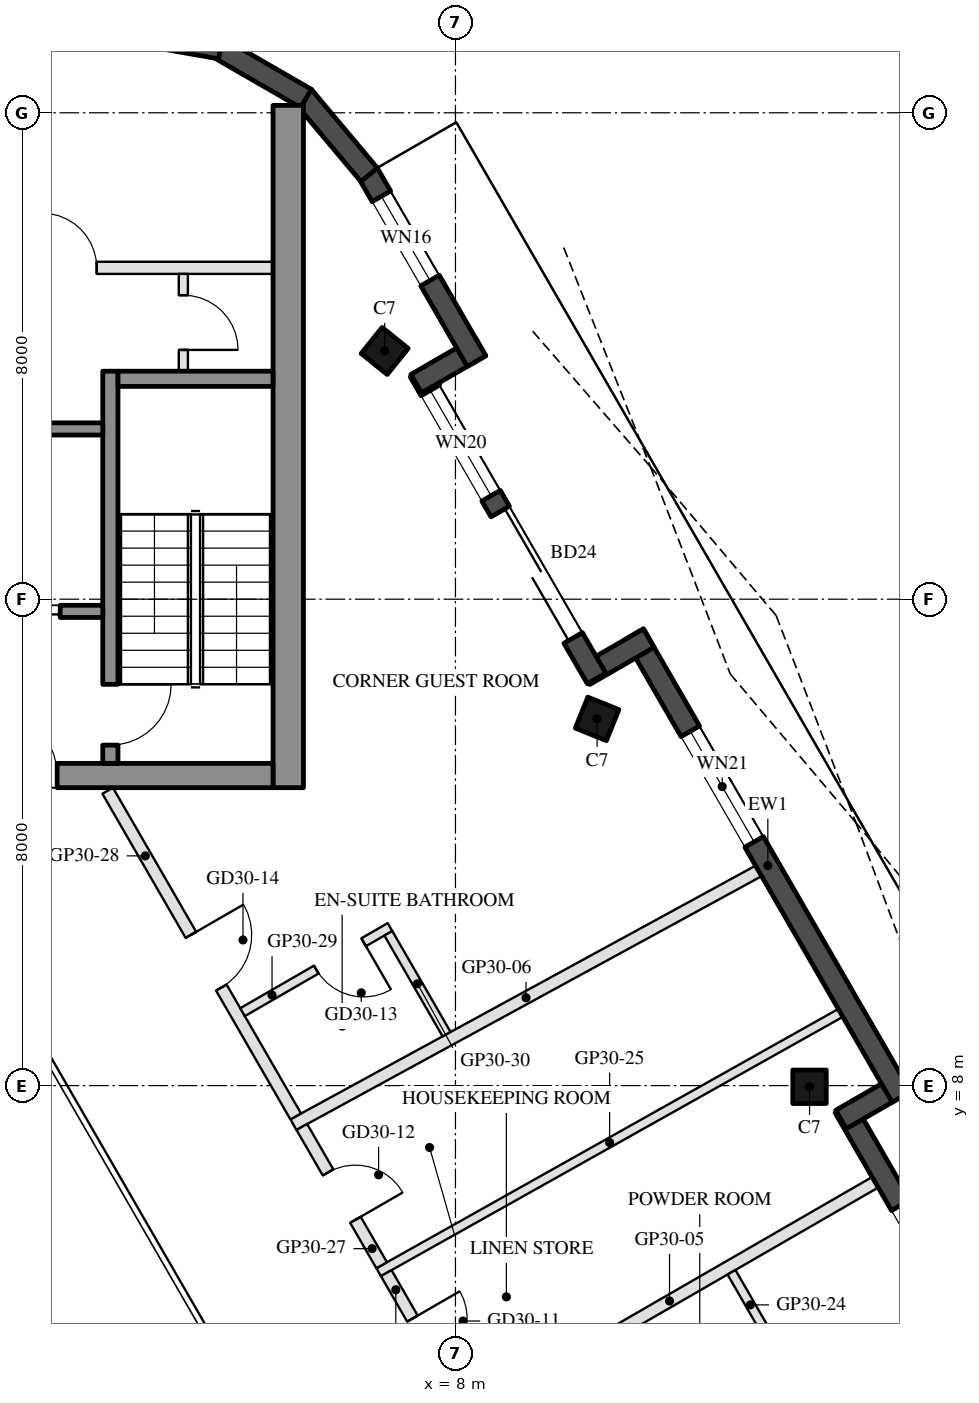
"""IFC4 building model, lengths in metres.
Left out: names, types, materials, properties, quantities, classifications, styles, units other than length and angle.
Written with IfcOpenShell. Run it as: python <this file> out.ifc"""

import sys

from ifc_helpers import new_model, si_unit, direction, frame, frame_2d, origin, origin_2d, place, context, subcontext, project, spatial, rectangle, hollow_rectangle, extrude, boolean, halfspace, element, fill, save


model = new_model("IFC4")
c1 = context("Model", 3, precision=1e-05, world=origin(), true_north=direction((0.0, 1.0)))
c2 = subcontext(c1, "Body", "Model", "MODEL_VIEW")
j1 = project(units=[si_unit("LENGTHUNIT", "METRE"), si_unit("PLANEANGLEUNIT", "RADIAN")], contexts=[c1])
p1 = place(None, origin())
s1 = spatial("IfcSite", under=j1, at=p1, CompositionType="ELEMENT")
p2 = place(p1, origin())
s2 = spatial("IfcBuilding", under=s1, at=p2, CompositionType="ELEMENT")
p3 = place(p2, frame((0.0, 0.0, 298.5)))
s3 = spatial("IfcBuildingStorey", under=s2, at=p3, CompositionType="ELEMENT", Elevation=298.5)
p4 = place(p3, frame((13.823, 7.981, 0.0), z_axis=(-0.131228839908, -0.075723997581, 0.988455799602), x_axis=(0.499841813697, -0.866116713392, 7.933019e-06)))
e1 = element("IfcColumn", 1, at=p4, inside=s3, PredefinedType="COLUMN", context=c2, shape_type="SweptSolid", body=[
    boolean("DIFFERENCE", boolean("DIFFERENCE", extrude(hollow_rectangle(XDim=0.55, YDim=0.55, WallThickness=0.025, at=origin_2d()), origin(), (0.0, 0.0, 1.0), 3.743), halfspace(frame((0.0, 0.0, 0.031), z_axis=(0.0, 0.0, 1.0), x_axis=(1.0, 0.0, 0.0)), True)), halfspace(frame((0.0, 0.0, 3.712), z_axis=(0.0, 0.0, 1.0), x_axis=(1.0, 0.0, 0.0)), False)),
])
p5 = place(p3, frame((10.33, 14.032, 0.0), z_axis=(-0.100518021011, -0.128316722417, 0.98662604172), x_axis=(-0.503129383785, 0.862065632243, 0.060857775822)))
e2 = element("IfcColumn", 2, at=p5, inside=s3, PredefinedType="COLUMN", context=c2, shape_type="SweptSolid", body=[
    boolean("DIFFERENCE", boolean("DIFFERENCE", extrude(hollow_rectangle(XDim=0.55, YDim=0.55, WallThickness=0.025, at=origin_2d()), origin(), (0.0, 0.0, 1.0), 3.75), halfspace(frame((0.0, 0.0, 0.034), z_axis=(0.0, 0.0, 1.0), x_axis=(1.0, 0.0, 0.0)), True)), halfspace(frame((0.0, 0.0, 3.716), z_axis=(0.0, 0.0, 1.0), x_axis=(1.0, 0.0, 0.0)), False)),
])
p6 = place(p3, frame((6.836, 20.083, 0.0), z_axis=(-0.069728397733, -0.180050765176, 0.981182792608), x_axis=(-0.504246941598, 0.855030910201, 0.121066776982)))
e3 = element("IfcColumn", 3, at=p6, inside=s3, PredefinedType="COLUMN", context=c2, shape_type="SweptSolid", body=[
    boolean("DIFFERENCE", boolean("DIFFERENCE", extrude(hollow_rectangle(XDim=0.55, YDim=0.55, WallThickness=0.025, at=origin_2d()), origin(), (0.0, 0.0, 1.0), 3.771), halfspace(frame((0.0, 0.0, 0.04), z_axis=(0.0, 0.0, 1.0), x_axis=(1.0, 0.0, 0.0)), True)), halfspace(frame((0.0, 0.0, 3.731), z_axis=(0.0, 0.0, 1.0), x_axis=(1.0, 0.0, 0.0)), False)),
])
p7 = place(p3, frame((17.308, 2.595, 0.0), z_axis=(0.0, 0.0, 1.0), x_axis=(-0.500005339912, 0.866022320763, 0.0)))
e4 = element("IfcWall", 4, at=p7, inside=s3, PredefinedType="SOLIDWALL", context=c2, shape_type="SweptSolid", body=[
    extrude(rectangle(XDim=5.827, YDim=0.35, at=frame_2d((2.914, 0.0))), origin(), (0.0, 0.0, 1.0), 3.55),
])
p8 = place(p7, frame((0.77, 0.0, 0.3)))
e5 = element("IfcOpeningElement", 5, at=p8, cuts=e4, PredefinedType="OPENING", context=c2, shape_type="SweptSolid", body=[
    extrude(rectangle(XDim=3.2, YDim=2.65, at=frame_2d((1.6, 1.325))), frame((0.0, 0.185, 0.0), z_axis=(0.0, -1.0, 0.0), x_axis=(1.0, 0.0, 0.0)), (0.0, 0.0, 1.0), 0.37),
])
p9 = place(p3, frame((14.342, 7.443, 0.0), z_axis=(0.0, 0.0, 1.0), x_axis=(0.866092288191, 0.499884134912, 0.0)))
e6 = element("IfcWall", 6, at=p9, inside=s3, PredefinedType="SOLIDWALL", context=c2, shape_type="SweptSolid", body=[
    extrude(rectangle(XDim=1.22, YDim=0.35, at=frame_2d((0.61, 0.0))), origin(), (0.0, 0.0, 1.0), 3.55),
])
p10 = place(p3, frame((15.334, 7.814, 0.0), z_axis=(0.0, 0.0, 1.0), x_axis=(-0.499999835575, 0.866025498715, 0.0)))
e7 = element("IfcWall", 7, at=p10, inside=s3, PredefinedType="SOLIDWALL", context=c2, shape_type="SweptSolid", body=[
    extrude(rectangle(XDim=8.787, YDim=0.35, at=frame_2d((4.394, 0.0))), origin(), (0.0, 0.0, 1.0), 3.55),
])
p11 = place(p10, frame((4.844, 0.0, 0.3)))
e8 = element("IfcOpeningElement", 8, at=p11, cuts=e7, PredefinedType="OPENING", context=c2, shape_type="SweptSolid", body=[
    extrude(rectangle(XDim=2.1, YDim=2.65, at=frame_2d((1.05, 1.325))), frame((0.0, 0.185, 0.0), z_axis=(0.0, -1.0, 0.0), x_axis=(1.0, 0.0, 0.0)), (0.0, 0.0, 1.0), 0.37),
])
p12 = place(p3, frame((11.18, 15.36, 0.0), z_axis=(0.0, 0.0, 1.0), x_axis=(-0.866055662726, -0.499947586314, 0.0)))
e9 = element("IfcWall", 9, at=p12, inside=s3, PredefinedType="SOLIDWALL", context=c2, shape_type="SweptSolid", body=[
    extrude(rectangle(XDim=1.22, YDim=0.35, at=frame_2d((0.61, 0.0))), origin(), (0.0, 0.0, 1.0), 3.55),
])
p13 = place(p3, frame((10.321, 14.697, 0.0), z_axis=(0.0, 0.0, 1.0), x_axis=(-0.500005339912, 0.866022320763, 0.0)))
e10 = element("IfcWall", 10, at=p13, inside=s3, PredefinedType="SOLIDWALL", context=c2, shape_type="SweptSolid", body=[
    extrude(rectangle(XDim=5.827, YDim=0.35, at=frame_2d((2.914, 0.0))), origin(), (0.0, 0.0, 1.0), 3.55),
])
p14 = place(p13, frame((0.77, 0.0, 0.0)))
e11 = element("IfcOpeningElement", 11, at=p14, cuts=e10, PredefinedType="OPENING", context=c2, shape_type="SweptSolid", body=[
    extrude(rectangle(XDim=2.4, YDim=2.4, at=frame_2d((1.2, 1.2))), frame((0.0, 0.185, 0.0), z_axis=(0.0, -1.0, 0.0), x_axis=(1.0, 0.0, 0.0)), (0.0, 0.0, 1.0), 0.37),
])
p15 = place(p13, frame((3.47, 0.0, 0.3)))
e12 = element("IfcOpeningElement", 12, at=p15, cuts=e10, PredefinedType="OPENING", context=c2, shape_type="SweptSolid", body=[
    extrude(rectangle(XDim=2.0, YDim=2.65, at=frame_2d((1.0, 1.325))), frame((0.0, 0.185, 0.0), z_axis=(0.0, -1.0, 0.0), x_axis=(1.0, 0.0, 0.0)), (0.0, 0.0, 1.0), 0.37),
])
p16 = place(p3, frame((7.354, 19.545, 0.0), z_axis=(0.0, 0.0, 1.0), x_axis=(0.865955602162, 0.500120880472, 0.0)))
e13 = element("IfcWall", 13, at=p16, inside=s3, PredefinedType="SOLIDWALL", context=c2, shape_type="SweptSolid", body=[
    extrude(rectangle(XDim=1.22, YDim=0.35, at=frame_2d((0.61, 0.0))), origin(), (0.0, 0.0, 1.0), 3.55),
])
p17 = place(p3, frame((8.347, 19.916, 0.0), z_axis=(0.0, 0.0, 1.0), x_axis=(-0.500010763282, 0.866019189511, 0.0)))
e14 = element("IfcWall", 14, at=p17, inside=s3, PredefinedType="SOLIDWALL", context=c2, shape_type="SweptSolid", body=[
    extrude(rectangle(XDim=3.567, YDim=0.35, at=frame_2d((1.784, 0.0))), origin(), (0.0, 0.0, 1.0), 3.55),
])
p18 = place(p17, frame((1.53, 0.0, 0.3)))
e15 = element("IfcOpeningElement", 15, at=p18, cuts=e14, PredefinedType="OPENING", context=c2, shape_type="SweptSolid", body=[
    extrude(rectangle(XDim=1.6, YDim=2.65, at=frame_2d((0.8, 1.325))), frame((0.0, 0.185, 0.0), z_axis=(0.0, -1.0, 0.0), x_axis=(1.0, 0.0, 0.0)), (0.0, 0.0, 1.0), 0.37),
])
for number, where, z_axis, x_axis in (
    (16, (6.581, 22.98, 0.0), (0.0, 0.0, 1.0), (-0.643, 0.766, 0.0)),
    (17, (5.542, 24.236, 0.0), (0.0, 0.0, 1.0), (-0.866, 0.5, 0.0)),
    (18, (4.135, 25.059, 0.0), (0.0, 0.0, 1.0), (-0.985, 0.174, 0.0)),
):
    element("IfcWall", number, at=place(p3, frame(where, z_axis=z_axis, x_axis=x_axis)), inside=s3, PredefinedType="SOLIDWALL", context=c2, shape_type="SweptSolid", body=[
        extrude(rectangle(XDim=1.689, YDim=0.35, at=frame_2d((0.845, 0.0))), origin(), (0.0, 0.0, 1.0), 3.55),
    ])
p19 = place(p3, frame((5.25, 12.9, 0.0), z_axis=(0.0, 0.0, 1.0), x_axis=(0.0, 1.0, 0.0)))
e19 = element("IfcWall", 19, at=p19, inside=s3, PredefinedType="SHEAR", context=c2, shape_type="SweptSolid", body=[
    extrude(rectangle(XDim=11.222, YDim=0.5, at=frame_2d((5.611, 0.0))), origin(), (0.0, 0.0, 1.0), 3.5),
])
p20 = place(p3, frame((5.0, 13.1, 0.0), z_axis=(0.0, 0.0, 1.0), x_axis=(-1.0, 0.0, 0.0)))
e20 = element("IfcWall", 20, at=p20, inside=s3, PredefinedType="SHEAR", context=c2, shape_type="SweptSolid", body=[
    extrude(rectangle(XDim=10.0, YDim=0.4, at=frame_2d((5.0, 0.0))), origin(), (0.0, 0.0, 1.0), 3.5),
])
p21 = place(p20, frame((3.55, 0.0, 0.0)))
e21 = element("IfcOpeningElement", 21, at=p21, cuts=e20, PredefinedType="OPENING", context=c2, shape_type="SweptSolid", body=[
    extrude(rectangle(XDim=1.1, YDim=2.1, at=frame_2d((0.55, 1.05))), frame((0.0, 0.21, 0.0), z_axis=(0.0, -1.0, 0.0), x_axis=(1.0, 0.0, 0.0)), (0.0, 0.0, 1.0), 0.42),
])
p22 = place(p20, frame((5.85, 0.0, 0.0)))
e22 = element("IfcOpeningElement", 22, at=p22, cuts=e20, PredefinedType="OPENING", context=c2, shape_type="SweptSolid", body=[
    extrude(rectangle(XDim=1.4, YDim=2.1, at=frame_2d((0.7, 1.05))), frame((0.0, 0.21, 0.0), z_axis=(0.0, -1.0, 0.0), x_axis=(1.0, 0.0, 0.0)), (0.0, 0.0, 1.0), 0.42),
])
p23 = place(p3, frame((2.325, 13.3, 0.0), z_axis=(0.0, 0.0, 1.0), x_axis=(0.0, 1.0, 0.0)))
e23 = element("IfcWall", 23, at=p23, inside=s3, PredefinedType="SHEAR", context=c2, shape_type="SweptSolid", body=[
    extrude(rectangle(XDim=6.45, YDim=0.25, at=frame_2d((3.225, 0.0))), origin(), (0.0, 0.0, 1.0), 3.5),
])
p24 = place(p23, frame((0.3, 0.0, 0.0)))
e24 = element("IfcOpeningElement", 24, at=p24, cuts=e23, PredefinedType="OPENING", context=c2, shape_type="SweptSolid", body=[
    extrude(rectangle(XDim=1.0, YDim=2.1, at=frame_2d((0.5, 1.05))), frame((0.0, 0.135, 0.0), z_axis=(0.0, -1.0, 0.0), x_axis=(1.0, 0.0, 0.0)), (0.0, 0.0, 1.0), 0.27),
])
p25 = place(p3, frame((5.0, 19.625, 0.0), z_axis=(0.0, 0.0, 1.0), x_axis=(-1.0, 0.0, 0.0)))
e25 = element("IfcWall", 25, at=p25, inside=s3, PredefinedType="SHEAR", context=c2, shape_type="SweptSolid", body=[
    extrude(rectangle(XDim=2.55, YDim=0.25, at=frame_2d((1.275, 0.0))), origin(), (0.0, 0.0, 1.0), 3.5),
])
p26 = place(p3, frame((2.2, 18.8, 0.0), z_axis=(0.0, 0.0, 1.0), x_axis=(-1.0, 0.0, 0.0)))
e26 = element("IfcWall", 26, at=p26, inside=s3, PredefinedType="SHEAR", context=c2, shape_type="SweptSolid", body=[
    extrude(rectangle(XDim=2.8, YDim=0.2, at=frame_2d((1.4, 0.0))), origin(), (0.0, 0.0, 1.0), 3.5),
])
p27 = place(p3, frame((2.2, 15.8, 0.0), z_axis=(0.0, 0.0, 1.0), x_axis=(-1.0, 0.0, 0.0)))
e27 = element("IfcWall", 27, at=p27, inside=s3, PredefinedType="SHEAR", context=c2, shape_type="SweptSolid", body=[
    extrude(rectangle(XDim=2.8, YDim=0.2, at=frame_2d((1.4, 0.0))), origin(), (0.0, 0.0, 1.0), 3.5),
])
p28 = place(p27, frame((0.7, 0.0, 0.0)))
e28 = element("IfcOpeningElement", 28, at=p28, cuts=e27, PredefinedType="OPENING", context=c2, shape_type="SweptSolid", body=[
    extrude(rectangle(XDim=1.2, YDim=2.1, at=frame_2d((0.6, 1.05))), frame((0.0, 0.11, 0.0), z_axis=(0.0, -1.0, 0.0), x_axis=(1.0, 0.0, 0.0)), (0.0, 0.0, 1.0), 0.22),
])
p29 = place(p3, frame((5.0, 21.45, 0.0), z_axis=(0.0, 0.0, 1.0), x_axis=(-1.0, 0.0, 0.0)))
e29 = element("IfcWall", 29, at=p29, inside=s3, PredefinedType="PARTITIONING", context=c2, shape_type="SweptSolid", body=[
    extrude(rectangle(XDim=5.4, YDim=0.2, at=frame_2d((2.7, 0.0))), origin(), (0.0, 0.0, 1.0), 3.5),
])
p30 = place(p29, frame((2.9, 0.0, 0.0)))
e30 = element("IfcOpeningElement", 30, at=p30, cuts=e29, PredefinedType="OPENING", context=c2, shape_type="SweptSolid", body=[
    extrude(rectangle(XDim=0.9, YDim=2.1, at=frame_2d((0.45, 1.05))), frame((0.0, 0.11, 0.0), z_axis=(0.0, -1.0, 0.0), x_axis=(1.0, 0.0, 0.0)), (0.0, 0.0, 1.0), 0.22),
])
p31 = place(p3, frame((3.525, 19.75, 0.0), z_axis=(0.0, 0.0, 1.0), x_axis=(0.0, 1.0, 0.0)))
e31 = element("IfcWall", 31, at=p31, inside=s3, PredefinedType="PARTITIONING", context=c2, shape_type="SweptSolid", body=[
    extrude(rectangle(XDim=1.6, YDim=0.15, at=frame_2d((0.8, 0.0))), origin(), (0.0, 0.0, 1.0), 3.5),
])
p32 = place(p31, frame((0.35, 0.0, 0.0)))
e32 = element("IfcOpeningElement", 32, at=p32, cuts=e31, PredefinedType="OPENING", context=c2, shape_type="SweptSolid", body=[
    extrude(rectangle(XDim=0.9, YDim=2.1, at=frame_2d((0.45, 1.05))), frame((0.0, 0.085, 0.0), z_axis=(0.0, -1.0, 0.0), x_axis=(1.0, 0.0, 0.0)), (0.0, 0.0, 1.0), 0.17),
])
p33 = place(p3, frame((14.903, 6.41, 0.0), z_axis=(0.0, 0.0, 1.0), x_axis=(-0.866030491634, -0.499991187483, 0.0)))
e33 = element("IfcWall", 33, at=p33, inside=s3, PredefinedType="PARTITIONING", context=c2, shape_type="SweptSolid", body=[
    extrude(rectangle(XDim=7.812, YDim=0.2, at=frame_2d((3.906, 0.0))), origin(), (0.0, 0.0, 1.0), 3.1),
])
p34 = place(p3, frame((12.986, 11.531, 0.0), z_axis=(0.0, 0.0, 1.0), x_axis=(-0.877887007044, -0.478867834442, 0.0)))
e34 = element("IfcWall", 34, at=p34, inside=s3, PredefinedType="PARTITIONING", context=c2, shape_type="SweptSolid", body=[
    extrude(rectangle(XDim=8.714, YDim=0.2, at=frame_2d((4.357, 0.0))), origin(), (0.0, 0.0, 1.0), 3.1),
])
p35 = place(p3, frame((13.315, 3.588, 0.0), z_axis=(0.0, 0.0, 1.0), x_axis=(-0.499967891604, 0.866043940782, 0.0)))
e35 = element("IfcWall", 35, at=p35, inside=s3, PredefinedType="PARTITIONING", context=c2, shape_type="SweptSolid", body=[
    extrude(rectangle(XDim=1.55, YDim=0.15, at=frame_2d((0.775, 0.0))), origin(), (0.0, 0.0, 1.0), 3.1),
])
p36 = place(p3, frame((14.334, 9.196, 0.0), z_axis=(0.0, 0.0, 1.0), x_axis=(-0.872016731473, -0.489476066863, 0.0)))
e36 = element("IfcWall", 36, at=p36, inside=s3, PredefinedType="PARTITIONING", context=c2, shape_type="SweptSolid", body=[
    extrude(rectangle(XDim=8.712, YDim=0.15, at=frame_2d((4.356, 0.0))), origin(), (0.0, 0.0, 1.0), 3.1),
])
p37 = place(p3, frame((6.862, 4.916, 0.0), z_axis=(0.0, 0.0, 1.0), x_axis=(0.499958506883, -0.866049358521, 0.0)))
e37 = element("IfcWall", 37, at=p37, inside=s3, PredefinedType="PARTITIONING", context=c2, shape_type="SweptSolid", body=[
    extrude(rectangle(XDim=2.626, YDim=0.2, at=frame_2d((1.313, 0.0))), origin(), (0.0, 0.0, 1.0), 3.1),
])
p38 = place(p37, frame((0.863, 0.0, 0.0)))
e38 = element("IfcOpeningElement", 38, at=p38, cuts=e37, PredefinedType="OPENING", context=c2, shape_type="SweptSolid", body=[
    extrude(rectangle(XDim=0.9, YDim=2.1, at=frame_2d((0.45, 1.05))), frame((0.0, 0.11, 0.0), z_axis=(0.0, -1.0, 0.0), x_axis=(1.0, 0.0, 0.0)), (0.0, 0.0, 1.0), 0.22),
])
p39 = place(p3, frame((5.473, 7.32, 0.0), z_axis=(0.0, 0.0, 1.0), x_axis=(0.500028228617, -0.866009105372, 0.0)))
e39 = element("IfcWall", 39, at=p39, inside=s3, PredefinedType="PARTITIONING", context=c2, shape_type="SweptSolid", body=[
    extrude(rectangle(XDim=2.626, YDim=0.2, at=frame_2d((1.313, 0.0))), origin(), (0.0, 0.0, 1.0), 3.1),
])
p40 = place(p39, frame((0.863, 0.0, 0.0)))
e40 = element("IfcOpeningElement", 40, at=p40, cuts=e39, PredefinedType="OPENING", context=c2, shape_type="SweptSolid", body=[
    extrude(rectangle(XDim=0.9, YDim=2.1, at=frame_2d((0.45, 1.05))), frame((0.0, 0.11, 0.0), z_axis=(0.0, -1.0, 0.0), x_axis=(1.0, 0.0, 0.0)), (0.0, 0.0, 1.0), 0.22),
])
p41 = place(p3, frame((2.281, 12.85, 0.0), z_axis=(0.0, 0.0, 1.0), x_axis=(0.499976409294, -0.866039023456, 0.0)))
e41 = element("IfcWall", 41, at=p41, inside=s3, PredefinedType="PARTITIONING", context=c2, shape_type="SweptSolid", body=[
    extrude(rectangle(XDim=6.186, YDim=0.2, at=frame_2d((3.093, 0.0))), origin(), (0.0, 0.0, 1.0), 3.1),
])
p42 = place(p41, frame((2.738, 0.0, 0.0)))
e42 = element("IfcOpeningElement", 42, at=p42, cuts=e41, PredefinedType="OPENING", context=c2, shape_type="SweptSolid", body=[
    extrude(rectangle(XDim=1.0, YDim=2.1, at=frame_2d((0.5, 1.05))), frame((0.0, 0.11, 0.0), z_axis=(0.0, -1.0, 0.0), x_axis=(1.0, 0.0, 0.0)), (0.0, 0.0, 1.0), 0.22),
])
p43 = place(p3, frame((6.924, 10.608, 0.0), z_axis=(0.0, 0.0, 1.0), x_axis=(-0.866034573852, -0.49998411664, 0.0)))
e43 = element("IfcWall", 43, at=p43, inside=s3, PredefinedType="PARTITIONING", context=c2, shape_type="SweptSolid", body=[
    extrude(rectangle(XDim=2.8, YDim=0.15, at=frame_2d((1.4, 0.0))), origin(), (0.0, 0.0, 1.0), 3.55),
])
p44 = place(p43, frame((0.5, 0.0, 0.0)))
e44 = element("IfcOpeningElement", 44, at=p44, cuts=e43, PredefinedType="OPENING", context=c2, shape_type="SweptSolid", body=[
    extrude(rectangle(XDim=0.9, YDim=2.1, at=frame_2d((0.45, 1.05))), frame((0.0, 0.085, 0.0), z_axis=(0.0, -1.0, 0.0), x_axis=(1.0, 0.0, 0.0)), (0.0, 0.0, 1.0), 0.17),
])
p45 = place(p3, frame((7.854, 8.846, 0.0), z_axis=(0.0, 0.0, 1.0), x_axis=(-0.500071685664, 0.865984012091, 0.0)))
e45 = element("IfcWall", 45, at=p45, inside=s3, PredefinedType="PARTITIONING", context=c2, shape_type="SweptSolid", body=[
    extrude(rectangle(XDim=1.916, YDim=0.15, at=frame_2d((0.958, 0.0))), origin(), (0.0, 0.0, 1.0), 3.55),
])
p46 = place(p11, origin())
e46 = element("IfcWindow", 46, at=p46, inside=s3, PartitioningType="SINGLE_PANEL", PredefinedType="WINDOW", context=c2, shape_type="SweptSolid", body=[
    extrude(rectangle(XDim=2.1, YDim=2.65, at=frame_2d((1.05, 1.325))), frame((0.0, 0.03, 0.0), z_axis=(0.0, -1.0, 0.0), x_axis=(1.0, 0.0, 0.0)), (0.0, 0.0, 1.0), 0.06),
])
fill(e8, e46)
p47 = place(p14, frame((2.4, 0.0, 0.0), z_axis=(0.0, 0.0, 1.0), x_axis=(-1.0, 0.0, 0.0)))
e47 = element("IfcDoor", 47, at=p47, inside=s3, OperationType="SLIDING_TO_LEFT", PredefinedType="DOOR", context=c2, shape_type="SweptSolid", body=[
    extrude(rectangle(XDim=2.4, YDim=2.4, at=frame_2d((1.2, 1.2))), frame((0.0, 0.025, 0.0), z_axis=(0.0, -1.0, 0.0), x_axis=(1.0, 0.0, 0.0)), (0.0, 0.0, 1.0), 0.05),
])
fill(e11, e47)
p48 = place(p15, origin())
e48 = element("IfcWindow", 48, at=p48, inside=s3, PartitioningType="SINGLE_PANEL", PredefinedType="WINDOW", context=c2, shape_type="SweptSolid", body=[
    extrude(rectangle(XDim=2.0, YDim=2.65, at=frame_2d((1.0, 1.325))), frame((0.0, 0.03, 0.0), z_axis=(0.0, -1.0, 0.0), x_axis=(1.0, 0.0, 0.0)), (0.0, 0.0, 1.0), 0.06),
])
fill(e12, e48)
p49 = place(p18, origin())
e49 = element("IfcWindow", 49, at=p49, inside=s3, PartitioningType="SINGLE_PANEL", PredefinedType="WINDOW", context=c2, shape_type="SweptSolid", body=[
    extrude(rectangle(XDim=1.6, YDim=2.65, at=frame_2d((0.8, 1.325))), frame((0.0, 0.03, 0.0), z_axis=(0.0, -1.0, 0.0), x_axis=(1.0, 0.0, 0.0)), (0.0, 0.0, 1.0), 0.06),
])
fill(e15, e49)
p50 = place(p28, origin())
e50 = element("IfcDoor", 50, at=p50, inside=s3, OperationType="DOUBLE_DOOR_SLIDING", PredefinedType="DOOR", context=c2, shape_type="SweptSolid", body=[
    extrude(rectangle(XDim=1.2, YDim=2.1, at=frame_2d((0.6, 1.05))), frame((0.0, 0.025, 0.0), z_axis=(0.0, -1.0, 0.0), x_axis=(1.0, 0.0, 0.0)), (0.0, 0.0, 1.0), 0.05),
])
fill(e28, e50)
p51 = place(p32, frame((0.9, 0.0, 0.0), z_axis=(0.0, 0.0, 1.0), x_axis=(-1.0, 0.0, 0.0)))
e51 = element("IfcDoor", 51, at=p51, inside=s3, OperationType="SINGLE_SWING_RIGHT", PredefinedType="DOOR", context=c2, shape_type="SweptSolid", body=[
    extrude(rectangle(XDim=0.9, YDim=2.1, at=frame_2d((0.45, 1.05))), frame((0.0, 0.025, 0.0), z_axis=(0.0, -1.0, 0.0), x_axis=(1.0, 0.0, 0.0)), (0.0, 0.0, 1.0), 0.05),
])
fill(e32, e51)
p52 = place(p30, frame((0.9, 0.0, 0.0), z_axis=(0.0, 0.0, 1.0), x_axis=(-1.0, 0.0, 0.0)))
e52 = element("IfcDoor", 52, at=p52, inside=s3, OperationType="SINGLE_SWING_LEFT", PredefinedType="DOOR", context=c2, shape_type="SweptSolid", body=[
    extrude(rectangle(XDim=0.9, YDim=2.1, at=frame_2d((0.45, 1.05))), frame((0.0, 0.025, 0.0), z_axis=(0.0, -1.0, 0.0), x_axis=(1.0, 0.0, 0.0)), (0.0, 0.0, 1.0), 0.05),
])
fill(e30, e52)
p53 = place(p21, frame((1.1, 0.0, 0.0), z_axis=(0.0, 0.0, 1.0), x_axis=(-1.0, 0.0, 0.0)))
e53 = element("IfcDoor", 53, at=p53, inside=s3, OperationType="SINGLE_SWING_LEFT", PredefinedType="DOOR", context=c2, shape_type="SweptSolid", body=[
    extrude(rectangle(XDim=1.1, YDim=2.1, at=frame_2d((0.55, 1.05))), frame((0.0, 0.025, 0.0), z_axis=(0.0, -1.0, 0.0), x_axis=(1.0, 0.0, 0.0)), (0.0, 0.0, 1.0), 0.05),
])
fill(e21, e53)
p54 = place(p24, frame((1.0, 0.0, 0.0), z_axis=(0.0, 0.0, 1.0), x_axis=(-1.0, 0.0, 0.0)))
e54 = element("IfcDoor", 54, at=p54, inside=s3, OperationType="SINGLE_SWING_LEFT", PredefinedType="DOOR", context=c2, shape_type="SweptSolid", body=[
    extrude(rectangle(XDim=1.0, YDim=2.1, at=frame_2d((0.5, 1.05))), frame((0.0, 0.025, 0.0), z_axis=(0.0, -1.0, 0.0), x_axis=(1.0, 0.0, 0.0)), (0.0, 0.0, 1.0), 0.05),
])
fill(e24, e54)
p55 = place(p38, origin())
e55 = element("IfcDoor", 55, at=p55, inside=s3, OperationType="SINGLE_SWING_LEFT", PredefinedType="DOOR", context=c2, shape_type="SweptSolid", body=[
    extrude(rectangle(XDim=0.9, YDim=2.1, at=frame_2d((0.45, 1.05))), frame((0.0, 0.025, 0.0), z_axis=(0.0, -1.0, 0.0), x_axis=(1.0, 0.0, 0.0)), (0.0, 0.0, 1.0), 0.05),
])
fill(e38, e55)
p56 = place(p40, origin())
e56 = element("IfcDoor", 56, at=p56, inside=s3, OperationType="SINGLE_SWING_RIGHT", PredefinedType="DOOR", context=c2, shape_type="SweptSolid", body=[
    extrude(rectangle(XDim=0.9, YDim=2.1, at=frame_2d((0.45, 1.05))), frame((0.0, 0.025, 0.0), z_axis=(0.0, -1.0, 0.0), x_axis=(1.0, 0.0, 0.0)), (0.0, 0.0, 1.0), 0.05),
])
fill(e40, e56)
p57 = place(p44, origin())
e57 = element("IfcDoor", 57, at=p57, inside=s3, OperationType="SINGLE_SWING_LEFT", PredefinedType="DOOR", context=c2, shape_type="SweptSolid", body=[
    extrude(rectangle(XDim=0.9, YDim=2.1, at=frame_2d((0.45, 1.05))), frame((0.0, 0.025, 0.0), z_axis=(0.0, -1.0, 0.0), x_axis=(1.0, 0.0, 0.0)), (0.0, 0.0, 1.0), 0.05),
])
fill(e44, e57)
p58 = place(p42, origin())
e58 = element("IfcDoor", 58, at=p58, inside=s3, OperationType="SINGLE_SWING_LEFT", PredefinedType="DOOR", context=c2, shape_type="SweptSolid", body=[
    extrude(rectangle(XDim=1.0, YDim=2.1, at=frame_2d((0.5, 1.05))), frame((0.0, 0.025, 0.0), z_axis=(0.0, -1.0, 0.0), x_axis=(1.0, 0.0, 0.0)), (0.0, 0.0, 1.0), 0.05),
])
fill(e42, e58)
save(model, sys.argv[1])
